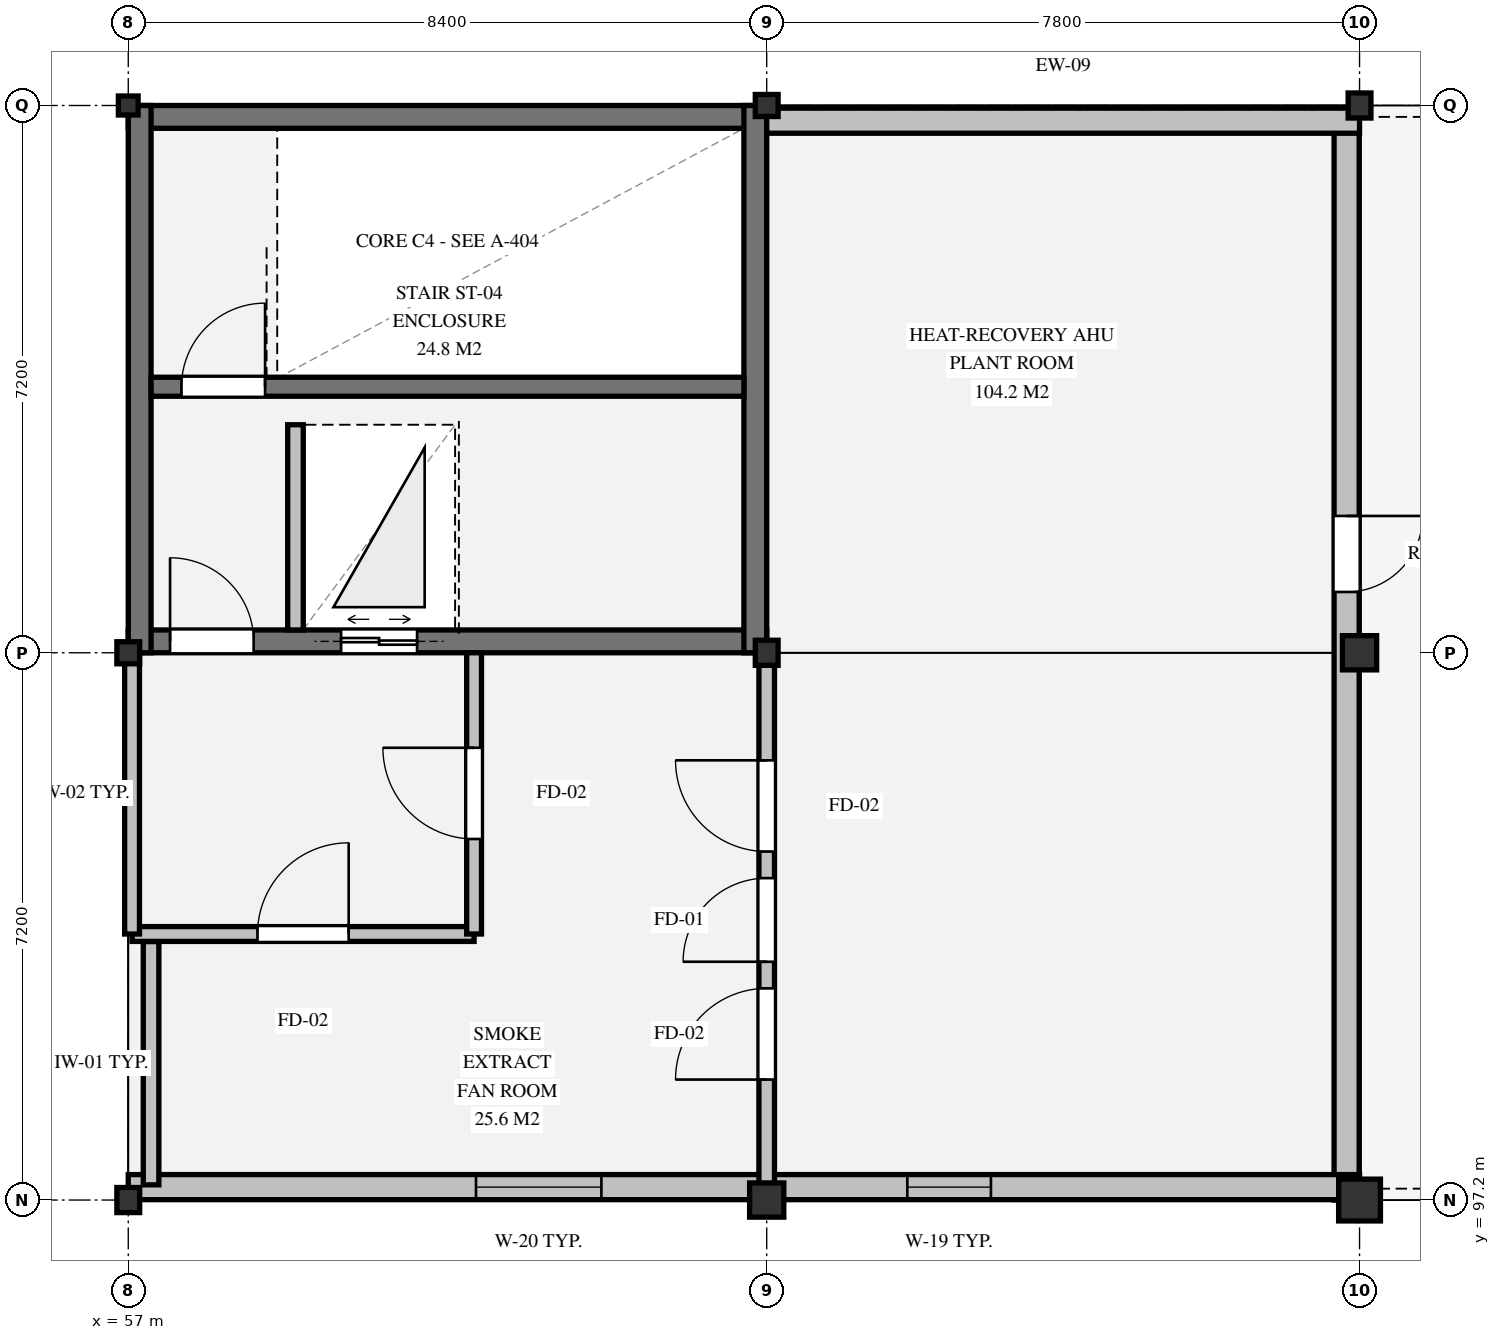
"""IFC4 building model, lengths in metres.
Left out: names, types, materials, properties, quantities, classifications, styles, units other than length and angle.
Written with IfcOpenShell. Run it as: python <this file> out.ifc"""

import sys

from ifc_helpers import new_model, si_unit, direction, frame, frame_2d, origin, origin_2d, place, context, subcontext, project, spatial, rectangle, i_section, extrude, element, fill, save


model = new_model("IFC4")
c1 = context("Model", 3, precision=1e-05, world=origin(), true_north=direction((0.0, 1.0)))
c2 = subcontext(c1, "Body", "Model", "MODEL_VIEW")
j1 = project(units=[si_unit("LENGTHUNIT", "METRE"), si_unit("PLANEANGLEUNIT", "RADIAN")], contexts=[c1])
p1 = place(None, origin())
s1 = spatial("IfcSite", under=j1, at=p1, CompositionType="ELEMENT")
p2 = place(p1, origin())
s2 = spatial("IfcBuilding", under=s1, at=p2, CompositionType="ELEMENT")
p3 = place(p2, frame((0.0, 0.0, 29.4)))
s3 = spatial("IfcBuildingStorey", under=s2, at=p3, CompositionType="ELEMENT", Elevation=29.4)
p4 = place(p3, frame((57.0, 111.45, 0.0), z_axis=(0.0, 0.0, 1.0), x_axis=(1.0, 0.0, 0.0)))
e1 = element("IfcWall", 1, at=p4, inside=s3, PredefinedType="SHEAR", context=c2, shape_type="SweptSolid", body=[
    extrude(rectangle(XDim=8.4, YDim=0.3, at=frame_2d((4.2, 0.0))), origin(), (0.0, 0.0, 1.0), 4.5),
])
p5 = place(p3, frame((57.0, 104.55, 0.0), z_axis=(0.0, 0.0, 1.0), x_axis=(1.0, 0.0, 0.0)))
e2 = element("IfcWall", 2, at=p5, inside=s3, PredefinedType="SHEAR", context=c2, shape_type="SweptSolid", body=[
    extrude(rectangle(XDim=8.4, YDim=0.3, at=frame_2d((4.2, 0.0))), origin(), (0.0, 0.0, 1.0), 4.5),
])
p6 = place(p5, frame((0.55, 0.0, 0.0)))
e3 = element("IfcOpeningElement", 3, at=p6, cuts=e2, PredefinedType="OPENING", context=c2, shape_type="SweptSolid", body=[
    extrude(rectangle(XDim=1.1, YDim=2.15, at=frame_2d((0.55, 1.075))), frame((0.0, 0.16, 0.0), z_axis=(0.0, -1.0, 0.0), x_axis=(1.0, 0.0, 0.0)), (0.0, 0.0, 1.0), 0.32),
])
p7 = place(p5, frame((2.8, 0.0, 0.0)))
e4 = element("IfcOpeningElement", 4, at=p7, cuts=e2, PredefinedType="OPENING", context=c2, shape_type="SweptSolid", body=[
    extrude(rectangle(XDim=1.0, YDim=2.1, at=frame_2d((0.5, 1.05))), frame((0.0, 0.16, 0.0), z_axis=(0.0, -1.0, 0.0), x_axis=(1.0, 0.0, 0.0)), (0.0, 0.0, 1.0), 0.32),
])
for number, where, z_axis, x_axis in (
    (5, (57.15, 104.4, 0.0), (0.0, 0.0, 1.0), (0.0, 1.0, 0.0)),
    (6, (65.25, 104.4, 0.0), (0.0, 0.0, 1.0), (0.0, 1.0, 0.0)),
):
    element("IfcWall", number, at=place(p3, frame(where, z_axis=z_axis, x_axis=x_axis)), inside=s3, PredefinedType="SHEAR", context=c2, shape_type="SweptSolid", body=[
        extrude(rectangle(XDim=7.2, YDim=0.3, at=frame_2d((3.6, 0.0))), origin(), (0.0, 0.0, 1.0), 4.5),
    ])
p8 = place(p3, frame((57.3, 107.9, 0.0), z_axis=(0.0, 0.0, 1.0), x_axis=(1.0, 0.0, 0.0)))
e7 = element("IfcWall", 7, at=p8, inside=s3, PredefinedType="SHEAR", context=c2, shape_type="SweptSolid", body=[
    extrude(rectangle(XDim=7.8, YDim=0.25, at=frame_2d((3.9, 0.0))), origin(), (0.0, 0.0, 1.0), 4.5),
])
p9 = place(p8, frame((0.4, 0.0, 0.0)))
e8 = element("IfcOpeningElement", 8, at=p9, cuts=e7, PredefinedType="OPENING", context=c2, shape_type="SweptSolid", body=[
    extrude(rectangle(XDim=1.1, YDim=2.15, at=frame_2d((0.55, 1.075))), frame((0.0, 0.135, 0.0), z_axis=(0.0, -1.0, 0.0), x_axis=(1.0, 0.0, 0.0)), (0.0, 0.0, 1.0), 0.27),
])
p10 = place(p3, frame((57.0, 97.2, 0.0), z_axis=(0.0, 0.0, 1.0), x_axis=(1.0, 0.0, 0.0)))
e9 = element("IfcColumn", 9, at=p10, inside=s3, PredefinedType="COLUMN", context=c2, shape_type="SweptSolid", body=[
    extrude(i_section(OverallWidth=0.3, OverallDepth=0.33, WebThickness=0.01, FlangeThickness=0.017, FilletRadius=0.027, at=origin_2d()), origin(), (0.0, 0.0, 1.0), 4.5),
])
p11 = place(p3, frame((57.0, 104.4, 0.0), z_axis=(0.0, 0.0, 1.0), x_axis=(1.0, 0.0, 0.0)))
e10 = element("IfcColumn", 10, at=p11, inside=s3, PredefinedType="COLUMN", context=c2, shape_type="SweptSolid", body=[
    extrude(i_section(OverallWidth=0.3, OverallDepth=0.29, WebThickness=0.009, FlangeThickness=0.014, FilletRadius=0.027, at=origin_2d()), origin(), (0.0, 0.0, 1.0), 4.95),
])
p12 = place(p3, frame((57.0, 111.6, 0.0), z_axis=(0.0, 0.0, 1.0), x_axis=(1.0, 0.0, 0.0)))
e11 = element("IfcColumn", 11, at=p12, inside=s3, PredefinedType="COLUMN", context=c2, shape_type="SweptSolid", body=[
    extrude(i_section(OverallWidth=0.26, OverallDepth=0.25, WebThickness=0.008, FlangeThickness=0.012, FilletRadius=0.024, at=origin_2d()), origin(), (0.0, 0.0, 1.0), 4.5),
])
p13 = place(p3, frame((65.4, 97.2, 0.0), z_axis=(0.0, 0.0, 1.0), x_axis=(1.0, 0.0, 0.0)))
e12 = element("IfcColumn", 12, at=p13, inside=s3, PredefinedType="COLUMN", context=c2, shape_type="SweptSolid", body=[
    extrude(rectangle(XDim=0.45, YDim=0.45, at=origin_2d()), origin(), (0.0, 0.0, 1.0), 4.5),
])
p14 = place(p3, frame((65.4, 104.4, 0.0), z_axis=(0.0, 0.0, 1.0), x_axis=(1.0, 0.0, 0.0)))
e13 = element("IfcColumn", 13, at=p14, inside=s3, PredefinedType="COLUMN", context=c2, shape_type="SweptSolid", body=[
    extrude(i_section(OverallWidth=0.3, OverallDepth=0.33, WebThickness=0.01, FlangeThickness=0.017, FilletRadius=0.027, at=origin_2d()), origin(), (0.0, 0.0, 1.0), 4.5),
])
p15 = place(p3, frame((65.4, 111.6, 0.0), z_axis=(0.0, 0.0, 1.0), x_axis=(1.0, 0.0, 0.0)))
e14 = element("IfcColumn", 14, at=p15, inside=s3, PredefinedType="COLUMN", context=c2, shape_type="SweptSolid", body=[
    extrude(i_section(OverallWidth=0.3, OverallDepth=0.29, WebThickness=0.009, FlangeThickness=0.014, FilletRadius=0.027, at=origin_2d()), origin(), (0.0, 0.0, 1.0), 4.5),
])
p16 = place(p3, frame((73.2, 97.2, 0.0), z_axis=(0.0, 0.0, 1.0), x_axis=(1.0, 0.0, 0.0)))
e15 = element("IfcColumn", 15, at=p16, inside=s3, PredefinedType="COLUMN", context=c2, shape_type="SweptSolid", body=[
    extrude(rectangle(XDim=0.55, YDim=0.55, at=origin_2d()), origin(), (0.0, 0.0, 1.0), 4.5),
])
p17 = place(p3, frame((73.2, 104.4, 0.0), z_axis=(0.0, 0.0, 1.0), x_axis=(1.0, 0.0, 0.0)))
e16 = element("IfcColumn", 16, at=p17, inside=s3, PredefinedType="COLUMN", context=c2, shape_type="SweptSolid", body=[
    extrude(rectangle(XDim=0.45, YDim=0.45, at=origin_2d()), origin(), (0.0, 0.0, 1.0), 4.95),
])
p18 = place(p3, frame((73.2, 111.6, 0.0), z_axis=(0.0, 0.0, 1.0), x_axis=(1.0, 0.0, 0.0)))
e17 = element("IfcColumn", 17, at=p18, inside=s3, PredefinedType="COLUMN", context=c2, shape_type="SweptSolid", body=[
    extrude(i_section(OverallWidth=0.3, OverallDepth=0.33, WebThickness=0.01, FlangeThickness=0.017, FilletRadius=0.027, at=origin_2d()), origin(), (0.0, 0.0, 1.0), 4.5),
])
p19 = place(p3, frame((73.03, 111.4, 0.0), z_axis=(0.0, 0.0, 1.0), x_axis=(0.0, -1.0, 0.0)))
e18 = element("IfcWall", 18, at=p19, inside=s3, PredefinedType="SOLIDWALL", context=c2, shape_type="SweptSolid", body=[
    extrude(rectangle(XDim=14.2, YDim=0.33, at=frame_2d((7.1, 0.0))), origin(), (0.0, 0.0, 1.0), 4.24),
])
p20 = place(p19, frame((5.2, 0.0, 0.0)))
e19 = element("IfcOpeningElement", 19, at=p20, cuts=e18, PredefinedType="OPENING", context=c2, shape_type="SweptSolid", body=[
    extrude(rectangle(XDim=1.0, YDim=2.15, at=frame_2d((0.5, 1.075))), frame((0.0, 0.175, 0.0), z_axis=(0.0, -1.0, 0.0), x_axis=(1.0, 0.0, 0.0)), (0.0, 0.0, 1.0), 0.35),
])
p21 = place(p3, frame((73.2, 97.37, 0.0), z_axis=(0.0, 0.0, 1.0), x_axis=(-1.0, 0.0, 0.0)))
e20 = element("IfcWall", 20, at=p21, inside=s3, PredefinedType="SOLIDWALL", context=c2, shape_type="SweptSolid", body=[
    extrude(rectangle(XDim=16.2, YDim=0.33, at=frame_2d((8.1, 0.0))), origin(), (0.0, 0.0, 1.0), 4.24),
])
p22 = place(p21, frame((4.85, 0.0, 0.85)))
e21 = element("IfcOpeningElement", 21, at=p22, cuts=e20, PredefinedType="OPENING", context=c2, shape_type="SweptSolid", body=[
    extrude(rectangle(XDim=1.1, YDim=1.4, at=frame_2d((0.55, 0.7))), frame((0.0, 0.175, 0.0), z_axis=(0.0, -1.0, 0.0), x_axis=(1.0, 0.0, 0.0)), (0.0, 0.0, 1.0), 0.35),
])
p23 = place(p21, frame((9.975, 0.0, 0.85)))
e22 = element("IfcOpeningElement", 22, at=p23, cuts=e20, PredefinedType="OPENING", context=c2, shape_type="SweptSolid", body=[
    extrude(rectangle(XDim=1.65, YDim=1.45, at=frame_2d((0.825, 0.725))), frame((0.0, 0.175, 0.0), z_axis=(0.0, -1.0, 0.0), x_axis=(1.0, 0.0, 0.0)), (0.0, 0.0, 1.0), 0.35),
])
p24 = place(p3, frame((65.4, 111.4, 0.0), z_axis=(0.0, 0.0, 1.0), x_axis=(1.0, 0.0, 0.0)))
e23 = element("IfcWall", 23, at=p24, inside=s3, PredefinedType="SOLIDWALL", context=c2, shape_type="SweptSolid", body=[
    extrude(rectangle(XDim=7.8, YDim=0.33, at=frame_2d((3.9, 0.0))), origin(), (0.0, 0.0, 1.0), 4.24),
])
p25 = place(p3, frame((59.2, 104.7, 0.0), z_axis=(0.0, 0.0, 1.0), x_axis=(0.0, 1.0, 0.0)))
e24 = element("IfcWall", 24, at=p25, inside=s3, PredefinedType="PARTITIONING", context=c2, shape_type="SweptSolid", body=[
    extrude(rectangle(XDim=2.7, YDim=0.205, at=frame_2d((1.35, 0.0))), origin(), (0.0, 0.0, 1.0), 4.23),
])
p26 = place(p3, frame((65.4, 97.37, 0.0), z_axis=(0.0, 0.0, 1.0), x_axis=(0.0, 1.0, 0.0)))
e25 = element("IfcWall", 25, at=p26, inside=s3, PredefinedType="PARTITIONING", context=c2, shape_type="SweptSolid", body=[
    extrude(rectangle(XDim=7.03, YDim=0.205, at=frame_2d((3.515, 0.0))), origin(), (0.0, 0.0, 1.0), 4.23),
])
p27 = place(p26, frame((2.965, 0.0, 0.0)))
e26 = element("IfcOpeningElement", 26, at=p27, cuts=e25, PredefinedType="OPENING", context=c2, shape_type="SweptSolid", body=[
    extrude(rectangle(XDim=1.1, YDim=2.15, at=frame_2d((0.55, 1.075))), frame((0.0, 0.113, 0.0), z_axis=(0.0, -1.0, 0.0), x_axis=(1.0, 0.0, 0.0)), (0.0, 0.0, 1.0), 0.225),
])
p28 = place(p26, frame((4.415, 0.0, 0.0)))
e27 = element("IfcOpeningElement", 27, at=p28, cuts=e25, PredefinedType="OPENING", context=c2, shape_type="SweptSolid", body=[
    extrude(rectangle(XDim=1.2, YDim=2.15, at=frame_2d((0.6, 1.075))), frame((0.0, 0.113, 0.0), z_axis=(0.0, -1.0, 0.0), x_axis=(1.0, 0.0, 0.0)), (0.0, 0.0, 1.0), 0.225),
])
p29 = place(p26, frame((1.415, 0.0, 0.0)))
e28 = element("IfcOpeningElement", 28, at=p29, cuts=e25, PredefinedType="OPENING", context=c2, shape_type="SweptSolid", body=[
    extrude(rectangle(XDim=1.2, YDim=2.15, at=frame_2d((0.6, 1.075))), frame((0.0, 0.113, 0.0), z_axis=(0.0, -1.0, 0.0), x_axis=(1.0, 0.0, 0.0)), (0.0, 0.0, 1.0), 0.225),
])
p30 = place(p3, frame((57.05, 100.7, 0.0), z_axis=(0.0, 0.0, 1.0), x_axis=(1.0, 0.0, 0.0)))
e29 = element("IfcWall", 29, at=p30, inside=s3, PredefinedType="PARTITIONING", context=c2, shape_type="SweptSolid", body=[
    extrude(rectangle(XDim=4.5, YDim=0.195, at=frame_2d((2.25, 0.0))), origin(), (0.0, 0.0, 1.0), 4.23),
])
p31 = place(p30, frame((1.65, 0.0, 0.0)))
e30 = element("IfcOpeningElement", 30, at=p31, cuts=e29, PredefinedType="OPENING", context=c2, shape_type="SweptSolid", body=[
    extrude(rectangle(XDim=1.2, YDim=2.15, at=frame_2d((0.6, 1.075))), frame((0.0, 0.107, 0.0), z_axis=(0.0, -1.0, 0.0), x_axis=(1.0, 0.0, 0.0)), (0.0, 0.0, 1.0), 0.215),
])
p32 = place(p3, frame((61.55, 100.7, 0.0), z_axis=(0.0, 0.0, 1.0), x_axis=(0.0, 1.0, 0.0)))
e31 = element("IfcWall", 31, at=p32, inside=s3, PredefinedType="PARTITIONING", context=c2, shape_type="SweptSolid", body=[
    extrude(rectangle(XDim=3.7, YDim=0.195, at=frame_2d((1.85, 0.0))), origin(), (0.0, 0.0, 1.0), 4.23),
])
p33 = place(p32, frame((1.25, 0.0, 0.0)))
e32 = element("IfcOpeningElement", 32, at=p33, cuts=e31, PredefinedType="OPENING", context=c2, shape_type="SweptSolid", body=[
    extrude(rectangle(XDim=1.2, YDim=2.15, at=frame_2d((0.6, 1.075))), frame((0.0, 0.107, 0.0), z_axis=(0.0, -1.0, 0.0), x_axis=(1.0, 0.0, 0.0)), (0.0, 0.0, 1.0), 0.215),
])
p34 = place(p3, frame((57.05, 100.7, 0.0), z_axis=(0.0, 0.0, 1.0), x_axis=(0.0, 1.0, 0.0)))
e33 = element("IfcWall", 33, at=p34, inside=s3, PredefinedType="PARTITIONING", context=c2, shape_type="SweptSolid", body=[
    extrude(rectangle(XDim=3.7, YDim=0.195, at=frame_2d((1.85, 0.0))), origin(), (0.0, 0.0, 1.0), 4.23),
])
p35 = place(p3, frame((57.3, 97.4, 0.0), z_axis=(0.0, 0.0, 1.0), x_axis=(0.0, 1.0, 0.0)))
e34 = element("IfcWall", 34, at=p35, inside=s3, PredefinedType="PARTITIONING", context=c2, shape_type="SweptSolid", body=[
    extrude(rectangle(XDim=3.2, YDim=0.205, at=frame_2d((1.6, 0.0))), origin(), (0.0, 0.0, 1.0), 4.23),
])
p36 = place(p20, origin())
e35 = element("IfcDoor", 35, at=p36, inside=s3, OperationType="SINGLE_SWING_LEFT", PredefinedType="DOOR", context=c2, shape_type="SweptSolid", body=[
    extrude(rectangle(XDim=1.0, YDim=2.15, at=frame_2d((0.5, 1.075))), frame((0.0, 0.025, 0.0), z_axis=(0.0, -1.0, 0.0), x_axis=(1.0, 0.0, 0.0)), (0.0, 0.0, 1.0), 0.05),
])
fill(e19, e35)
p37 = place(p22, origin())
e36 = element("IfcWindow", 36, at=p37, inside=s3, PartitioningType="SINGLE_PANEL", PredefinedType="WINDOW", context=c2, shape_type="SweptSolid", body=[
    extrude(rectangle(XDim=1.1, YDim=1.4, at=frame_2d((0.55, 0.7))), frame((0.0, 0.03, 0.0), z_axis=(0.0, -1.0, 0.0), x_axis=(1.0, 0.0, 0.0)), (0.0, 0.0, 1.0), 0.06),
])
fill(e21, e36)
p38 = place(p23, origin())
e37 = element("IfcWindow", 37, at=p38, inside=s3, PartitioningType="SINGLE_PANEL", PredefinedType="WINDOW", context=c2, shape_type="SweptSolid", body=[
    extrude(rectangle(XDim=1.65, YDim=1.45, at=frame_2d((0.825, 0.725))), frame((0.0, 0.03, 0.0), z_axis=(0.0, -1.0, 0.0), x_axis=(1.0, 0.0, 0.0)), (0.0, 0.0, 1.0), 0.06),
])
fill(e22, e37)
p39 = place(p9, origin())
e38 = element("IfcDoor", 38, at=p39, inside=s3, OperationType="SINGLE_SWING_RIGHT", PredefinedType="DOOR", context=c2, shape_type="SweptSolid", body=[
    extrude(rectangle(XDim=1.1, YDim=2.15, at=frame_2d((0.55, 1.075))), frame((0.0, 0.025, 0.0), z_axis=(0.0, -1.0, 0.0), x_axis=(1.0, 0.0, 0.0)), (0.0, 0.0, 1.0), 0.05),
])
fill(e8, e38)
p40 = place(p6, origin())
e39 = element("IfcDoor", 39, at=p40, inside=s3, OperationType="SINGLE_SWING_LEFT", PredefinedType="DOOR", context=c2, shape_type="SweptSolid", body=[
    extrude(rectangle(XDim=1.1, YDim=2.15, at=frame_2d((0.55, 1.075))), frame((0.0, 0.025, 0.0), z_axis=(0.0, -1.0, 0.0), x_axis=(1.0, 0.0, 0.0)), (0.0, 0.0, 1.0), 0.05),
])
fill(e3, e39)
p41 = place(p7, origin())
e40 = element("IfcDoor", 40, at=p41, inside=s3, OperationType="DOUBLE_DOOR_SLIDING", PredefinedType="DOOR", context=c2, shape_type="SweptSolid", body=[
    extrude(rectangle(XDim=1.0, YDim=2.1, at=frame_2d((0.5, 1.05))), frame((0.0, 0.025, 0.0), z_axis=(0.0, -1.0, 0.0), x_axis=(1.0, 0.0, 0.0)), (0.0, 0.0, 1.0), 0.05),
])
fill(e4, e40)
p42 = place(p27, origin())
e41 = element("IfcDoor", 41, at=p42, inside=s3, OperationType="SINGLE_SWING_LEFT", PredefinedType="DOOR", context=c2, shape_type="SweptSolid", body=[
    extrude(rectangle(XDim=1.1, YDim=2.15, at=frame_2d((0.55, 1.075))), frame((0.0, 0.025, 0.0), z_axis=(0.0, -1.0, 0.0), x_axis=(1.0, 0.0, 0.0)), (0.0, 0.0, 1.0), 0.05),
])
fill(e26, e41)
p43 = place(p31, origin())
e42 = element("IfcDoor", 42, at=p43, inside=s3, OperationType="SINGLE_SWING_RIGHT", PredefinedType="DOOR", context=c2, shape_type="SweptSolid", body=[
    extrude(rectangle(XDim=1.2, YDim=2.15, at=frame_2d((0.6, 1.075))), frame((0.0, 0.025, 0.0), z_axis=(0.0, -1.0, 0.0), x_axis=(1.0, 0.0, 0.0)), (0.0, 0.0, 1.0), 0.05),
])
fill(e30, e42)
p44 = place(p28, origin())
e43 = element("IfcDoor", 43, at=p44, inside=s3, OperationType="SINGLE_SWING_RIGHT", PredefinedType="DOOR", context=c2, shape_type="SweptSolid", body=[
    extrude(rectangle(XDim=1.2, YDim=2.15, at=frame_2d((0.6, 1.075))), frame((0.0, 0.025, 0.0), z_axis=(0.0, -1.0, 0.0), x_axis=(1.0, 0.0, 0.0)), (0.0, 0.0, 1.0), 0.05),
])
fill(e27, e43)
p45 = place(p29, origin())
e44 = element("IfcDoor", 44, at=p45, inside=s3, OperationType="SINGLE_SWING_LEFT", PredefinedType="DOOR", context=c2, shape_type="SweptSolid", body=[
    extrude(rectangle(XDim=1.2, YDim=2.15, at=frame_2d((0.6, 1.075))), frame((0.0, 0.025, 0.0), z_axis=(0.0, -1.0, 0.0), x_axis=(1.0, 0.0, 0.0)), (0.0, 0.0, 1.0), 0.05),
])
fill(e28, e44)
p46 = place(p33, origin())
e45 = element("IfcDoor", 45, at=p46, inside=s3, OperationType="SINGLE_SWING_RIGHT", PredefinedType="DOOR", context=c2, shape_type="SweptSolid", body=[
    extrude(rectangle(XDim=1.2, YDim=2.15, at=frame_2d((0.6, 1.075))), frame((0.0, 0.025, 0.0), z_axis=(0.0, -1.0, 0.0), x_axis=(1.0, 0.0, 0.0)), (0.0, 0.0, 1.0), 0.05),
])
fill(e32, e45)
save(model, sys.argv[1])
